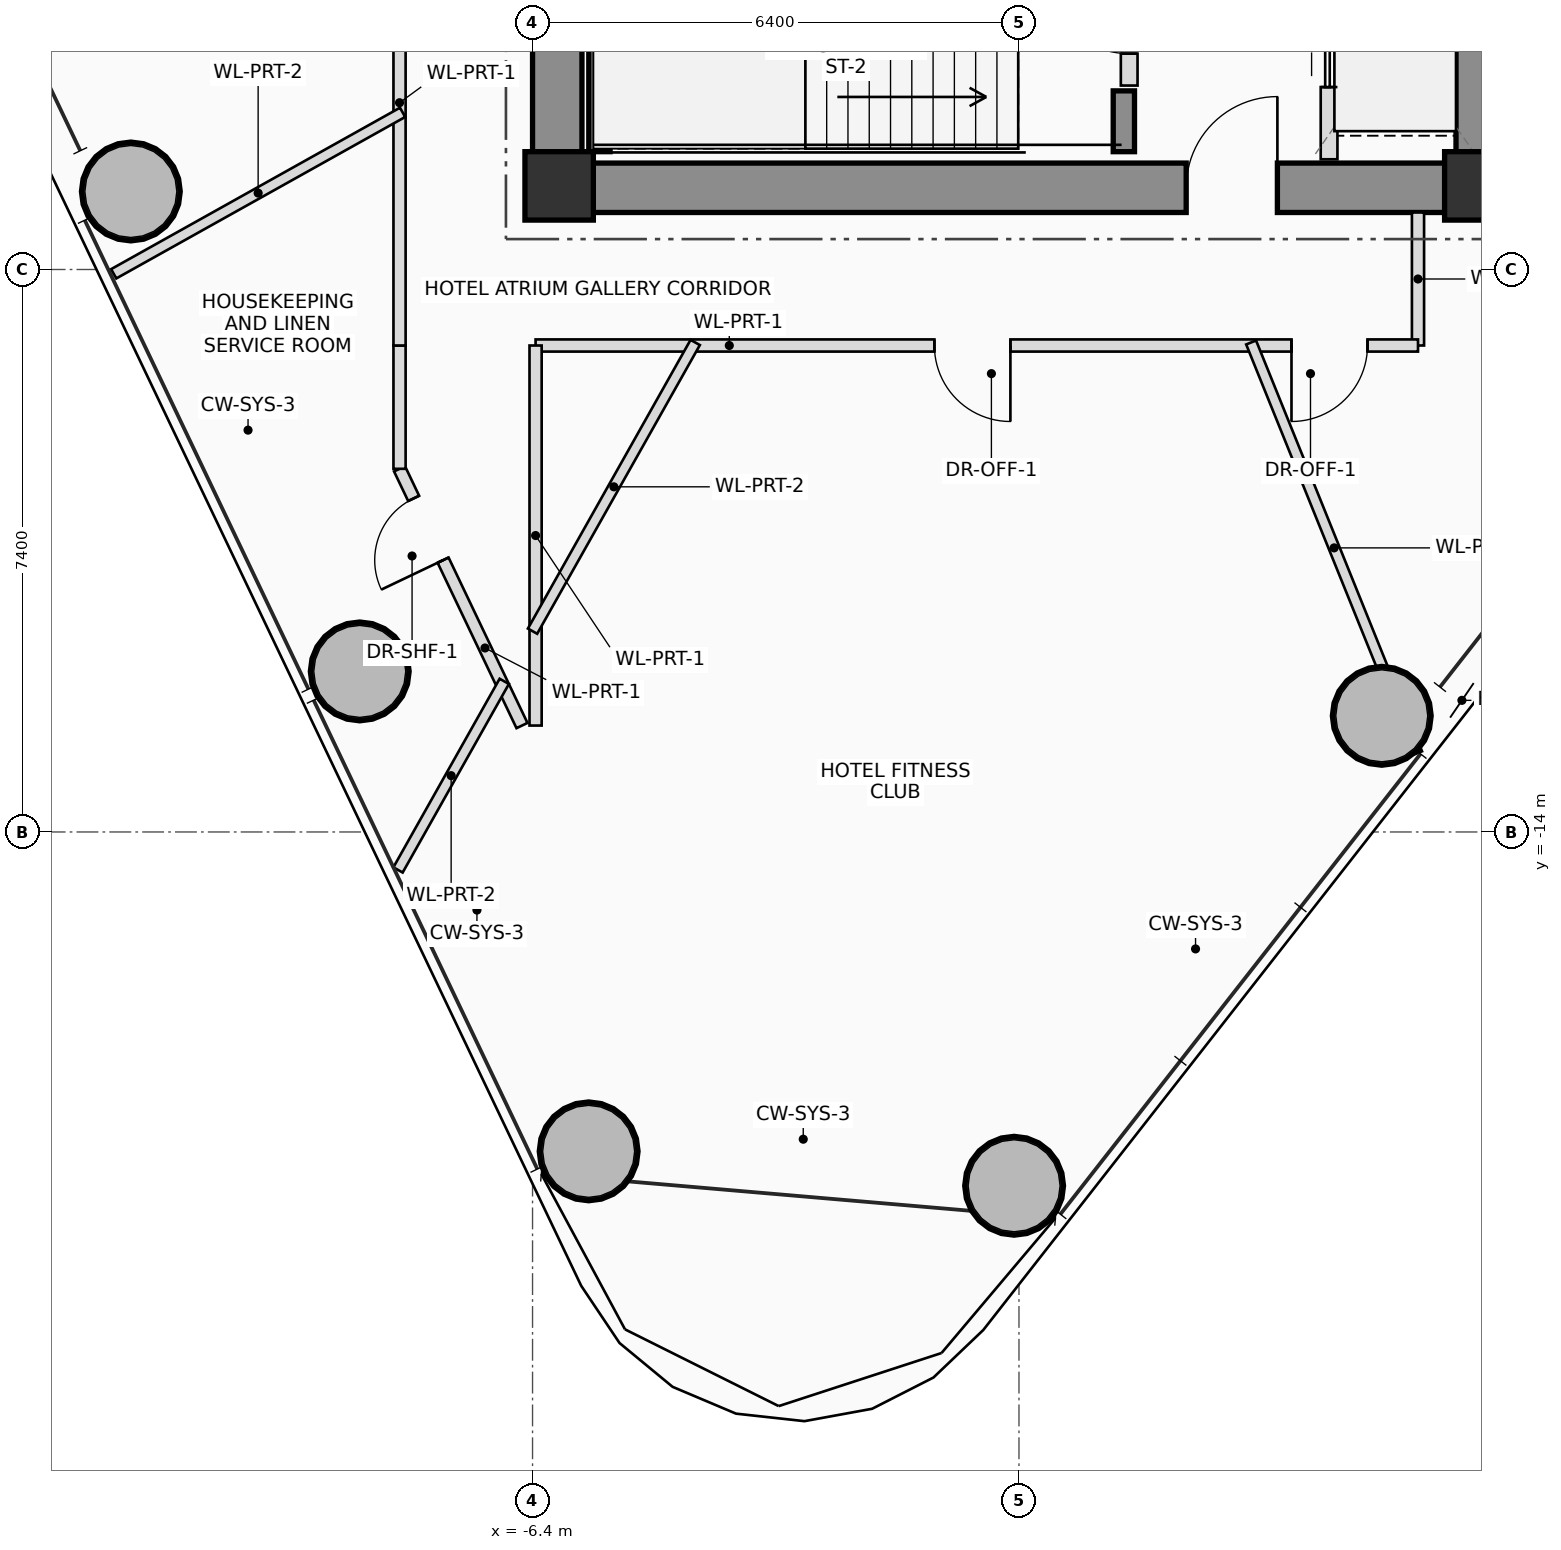
"""IFC4 building model, lengths in metres.
Left out: names, types, materials, properties, quantities, classifications, styles, units other than length and angle.
Written with IfcOpenShell. Run it as: python <this file> out.ifc"""

import sys

from ifc_helpers import new_model, si_unit, direction, frame, frame_2d, origin, origin_2d, place, context, subcontext, project, spatial, rectangle, hollow_circle, extrude, source, transform, mapped, element, fill, save


model = new_model("IFC4")
c1 = context("Model", 3, precision=1e-05, world=origin(), true_north=direction((0.0, 1.0)))
c2 = subcontext(c1, "Body", "Model", "MODEL_VIEW")
j1 = project(units=[si_unit("LENGTHUNIT", "METRE"), si_unit("PLANEANGLEUNIT", "RADIAN")], contexts=[c1])
p1 = place(None, origin())
s1 = spatial("IfcSite", under=j1, at=p1, CompositionType="ELEMENT")
p2 = place(p1, origin())
s2 = spatial("IfcBuilding", under=s1, at=p2, CompositionType="ELEMENT")
p3 = place(p2, frame((0.0, 0.0, 143.3)))
s3 = spatial("IfcBuildingStorey", under=s2, at=p3, CompositionType="ELEMENT", Elevation=143.3)
m1 = source(origin(), c2, "Body", "SweptSolid", [
    extrude(rectangle(XDim=0.9, YDim=0.9, at=origin_2d()), origin(), (0.0, 0.0, 1.0), 3.45),
])
for number, where, z_axis, x_axis in (
    (1, (-6.05, -5.5, 0.0), (0.0, 0.0, 1.0), (1.0, 0.0, 0.0)),
    (2, (6.05, -5.5, 0.0), (0.0, 0.0, 1.0), (1.0, 0.0, 0.0)),
):
    element("IfcColumn", number, at=place(p3, frame(where, z_axis=z_axis, x_axis=x_axis)), inside=s3, PredefinedType="COLUMN", context=c2, shape_type="MappedRepresentation", body=[
        mapped(m1, transform((0.0, 0.0, 0.0), scale=1.0)),
    ])
p4 = place(p3, frame((-6.4, -5.525, 0.0), z_axis=(0.0, 0.0, 1.0), x_axis=(1.0, 0.0, 0.0)))
e3 = element("IfcWall", 3, at=p4, inside=s3, PredefinedType="SHEAR", context=c2, shape_type="SweptSolid", body=[
    extrude(rectangle(XDim=12.8, YDim=0.65, at=frame_2d((6.4, 0.0))), origin(), (0.0, 0.0, 1.0), 3.45),
])
p5 = place(p4, frame((8.6, 0.0, 0.0)))
e4 = element("IfcOpeningElement", 4, at=p5, cuts=e3, PredefinedType="OPENING", context=c2, shape_type="SweptSolid", body=[
    extrude(rectangle(XDim=1.2, YDim=2.2, at=frame_2d((0.6, 1.1))), frame((0.0, 0.335, 0.0), z_axis=(0.0, -1.0, 0.0), x_axis=(1.0, 0.0, 0.0)), (0.0, 0.0, 1.0), 0.67),
])
p6 = place(p3, frame((6.075, -5.2, 0.0), z_axis=(0.0, 0.0, 1.0), x_axis=(0.0, 1.0, 0.0)))
e5 = element("IfcWall", 5, at=p6, inside=s3, PredefinedType="SHEAR", context=c2, shape_type="SweptSolid", body=[
    extrude(rectangle(XDim=10.4, YDim=0.65, at=frame_2d((5.2, 0.0))), origin(), (0.0, 0.0, 1.0), 3.45),
])
p7 = place(p3, frame((-6.075, -5.2, 0.0), z_axis=(0.0, 0.0, 1.0), x_axis=(0.0, 1.0, 0.0)))
e6 = element("IfcWall", 6, at=p7, inside=s3, PredefinedType="SHEAR", context=c2, shape_type="SweptSolid", body=[
    extrude(rectangle(XDim=3.45, YDim=0.65, at=frame_2d((1.725, 0.0))), origin(), (0.0, 0.0, 1.0), 3.45),
])
p8 = place(p3, frame((-5.52, -5.05, 0.0), z_axis=(0.0, 0.0, 1.0), x_axis=(0.0, 1.0, 0.0)))
e7 = element("IfcWall", 7, at=p8, inside=s3, PredefinedType="SHEAR", context=c2, shape_type="SweptSolid", body=[
    extrude(rectangle(XDim=2.75, YDim=0.28, at=frame_2d((1.375, 0.0))), origin(), (0.0, 0.0, 1.0), 3.45),
])
p9 = place(p3, frame((1.38, -5.05, 0.0), z_axis=(0.0, 0.0, 1.0), x_axis=(0.0, 1.0, 0.0)))
e8 = element("IfcWall", 8, at=p9, inside=s3, PredefinedType="SHEAR", context=c2, shape_type="SweptSolid", body=[
    extrude(rectangle(XDim=0.8, YDim=0.28, at=frame_2d((0.4, 0.0))), origin(), (0.0, 0.0, 1.0), 3.45),
])
m2 = source(origin(), c2, "Body", "SweptSolid", [
    extrude(hollow_circle(Radius=0.65, WallThickness=0.045, at=origin_2d()), origin(), (0.0, 0.0, 1.0), 3.45),
])
for number, where, z_axis, x_axis in (
    (9, (-0.064, -18.655, 0.0), (0.0, 0.0, 1.0), (1.0, 0.0, 0.0)),
    (10, (4.773, -12.472, 0.0), (0.0, 0.0, 1.0), (1.0, 0.0, 0.0)),
    (11, (-11.685, -5.573, 0.0), (0.0, 0.0, 1.0), (1.0, 0.0, 0.0)),
    (12, (-8.674, -11.888, 0.0), (0.0, 0.0, 1.0), (1.0, 0.0, 0.0)),
    (13, (-5.662, -18.202, 0.0), (0.0, 0.0, 1.0), (1.0, 0.0, 0.0)),
):
    element("IfcColumn", number, at=place(p3, frame(where, z_axis=z_axis, x_axis=x_axis)), inside=s3, PredefinedType="COLUMN", context=c2, shape_type="MappedRepresentation", body=[
        mapped(m2, transform((0.0, 0.0, 0.0), scale=1.0)),
    ])
p10 = place(p3, frame((1.45, -4.18, 0.0), z_axis=(0.0, 0.0, 1.0), x_axis=(0.0, 1.0, 0.0)))
e14 = element("IfcWall", 14, at=p10, inside=s3, PredefinedType="PLUMBINGWALL", context=c2, shape_type="SweptSolid", body=[
    extrude(rectangle(XDim=1.98, YDim=0.22, at=frame_2d((0.99, 0.0))), origin(), (0.0, 0.0, 1.0), 3.25),
])
p11 = place(p10, frame((0.42, 0.0, 0.0)))
e15 = element("IfcOpeningElement", 15, at=p11, cuts=e14, PredefinedType="OPENING", context=c2, shape_type="SweptSolid", body=[
    extrude(rectangle(XDim=1.15, YDim=2.15, at=frame_2d((0.575, 1.075))), frame((0.0, 0.12, 0.0), z_axis=(0.0, -1.0, 0.0), x_axis=(1.0, 0.0, 0.0)), (0.0, 0.0, 1.0), 0.24),
])
p12 = place(p3, frame((4.08, -5.15, 0.0), z_axis=(0.0, 0.0, 1.0), x_axis=(0.0, 1.0, 0.0)))
e16 = element("IfcWall", 16, at=p12, inside=s3, PredefinedType="PLUMBINGWALL", context=c2, shape_type="SweptSolid", body=[
    extrude(rectangle(XDim=2.95, YDim=0.22, at=frame_2d((1.475, 0.0))), origin(), (0.0, 0.0, 1.0), 3.25),
])
p13 = place(p12, frame((0.95, 0.0, 0.0)))
e17 = element("IfcOpeningElement", 17, at=p13, cuts=e16, PredefinedType="OPENING", context=c2, shape_type="SweptSolid", body=[
    extrude(rectangle(XDim=1.2, YDim=2.25, at=frame_2d((0.6, 1.125))), frame((0.0, 0.12, 0.0), z_axis=(0.0, -1.0, 0.0), x_axis=(1.0, 0.0, 0.0)), (0.0, 0.0, 1.0), 0.24),
])
p14 = place(p3, frame((-6.539, -12.6, 0.0), z_axis=(0.0, 0.0, 1.0), x_axis=(-0.430488060039, 0.902596271965, 0.0)))
e18 = element("IfcWall", 18, at=p14, inside=s3, PredefinedType="PARTITIONING", context=c2, shape_type="SweptSolid", body=[
    extrude(rectangle(XDim=3.742, YDim=0.16, at=frame_2d((1.871, 0.0))), origin(), (0.0, 0.0, 1.0), 2.605),
])
p15 = place(p14, frame((2.411, 0.0, 0.0)))
e19 = element("IfcOpeningElement", 19, at=p15, cuts=e18, PredefinedType="OPENING", context=c2, shape_type="SweptSolid", body=[
    extrude(rectangle(XDim=0.9, YDim=2.05, at=frame_2d((0.45, 1.025))), frame((0.0, 0.09, 0.0), z_axis=(0.0, -1.0, 0.0), x_axis=(1.0, 0.0, 0.0)), (0.0, 0.0, 1.0), 0.18),
])
p16 = place(p3, frame((-8.15, -9.222, 0.0), z_axis=(0.0, 0.0, 1.0), x_axis=(0.0, 1.0, 0.0)))
e20 = element("IfcWall", 20, at=p16, inside=s3, PredefinedType="PARTITIONING", context=c2, shape_type="SweptSolid", body=[
    extrude(rectangle(XDim=1.622, YDim=0.16, at=frame_2d((0.811, 0.0))), origin(), (0.0, 0.0, 1.0), 2.905),
])
p17 = place(p3, frame((-8.15, -7.6, 0.0), z_axis=(0.0, 0.0, 1.0), x_axis=(0.0, 1.0, 0.0)))
e21 = element("IfcWall", 21, at=p17, inside=s3, PredefinedType="PARTITIONING", context=c2, shape_type="SweptSolid", body=[
    extrude(rectangle(XDim=15.2, YDim=0.16, at=frame_2d((7.6, 0.0))), origin(), (0.0, 0.0, 1.0), 2.605),
])
p18 = place(p17, frame((6.538, 0.0, 0.0)))
e22 = element("IfcOpeningElement", 22, at=p18, cuts=e21, PredefinedType="OPENING", context=c2, shape_type="SweptSolid", body=[
    extrude(rectangle(XDim=1.05, YDim=2.2, at=frame_2d((0.525, 1.1))), frame((0.0, 0.09, 0.0), z_axis=(0.0, -1.0, 0.0), x_axis=(1.0, 0.0, 0.0)), (0.0, 0.0, 1.0), 0.18),
])
p19 = place(p17, frame((12.548, 0.0, 0.0)))
e23 = element("IfcOpeningElement", 23, at=p19, cuts=e21, PredefinedType="OPENING", context=c2, shape_type="SweptSolid", body=[
    extrude(rectangle(XDim=1.05, YDim=2.2, at=frame_2d((0.525, 1.1))), frame((0.0, 0.09, 0.0), z_axis=(0.0, -1.0, 0.0), x_axis=(1.0, 0.0, 0.0)), (0.0, 0.0, 1.0), 0.18),
])
p20 = place(p3, frame((5.25, -5.85, 0.0), z_axis=(0.0, 0.0, 1.0), x_axis=(0.0, -1.0, 0.0)))
e24 = element("IfcWall", 24, at=p20, inside=s3, PredefinedType="PARTITIONING", context=c2, shape_type="SweptSolid", body=[
    extrude(rectangle(XDim=1.75, YDim=0.16, at=frame_2d((0.875, 0.0))), origin(), (0.0, 0.0, 1.0), 3.25),
])
p21 = place(p3, frame((5.25, -7.6, 0.0), z_axis=(0.0, 0.0, 1.0), x_axis=(-1.0, 0.0, 0.0)))
e25 = element("IfcWall", 25, at=p21, inside=s3, PredefinedType="PARTITIONING", context=c2, shape_type="SweptSolid", body=[
    extrude(rectangle(XDim=11.61, YDim=0.16, at=frame_2d((5.805, 0.0))), origin(), (0.0, 0.0, 1.0), 2.605),
])
p22 = place(p21, frame((0.665, 0.0, 0.0)))
e26 = element("IfcOpeningElement", 26, at=p22, cuts=e25, PredefinedType="OPENING", context=c2, shape_type="SweptSolid", body=[
    extrude(rectangle(XDim=1.0, YDim=2.25, at=frame_2d((0.5, 1.125))), frame((0.0, 0.09, 0.0), z_axis=(0.0, -1.0, 0.0), x_axis=(1.0, 0.0, 0.0)), (0.0, 0.0, 1.0), 0.18),
])
p23 = place(p21, frame((5.363, 0.0, 0.0)))
e27 = element("IfcOpeningElement", 27, at=p23, cuts=e25, PredefinedType="OPENING", context=c2, shape_type="SweptSolid", body=[
    extrude(rectangle(XDim=1.0, YDim=2.25, at=frame_2d((0.5, 1.125))), frame((0.0, 0.09, 0.0), z_axis=(0.0, -1.0, 0.0), x_axis=(1.0, 0.0, 0.0)), (0.0, 0.0, 1.0), 0.18),
])
p24 = place(p3, frame((-6.36, -7.6, 0.0), z_axis=(0.0, 0.0, 1.0), x_axis=(0.0, -1.0, 0.0)))
e28 = element("IfcWall", 28, at=p24, inside=s3, PredefinedType="PARTITIONING", context=c2, shape_type="SweptSolid", body=[
    extrude(rectangle(XDim=5.0, YDim=0.16, at=frame_2d((2.5, 0.0))), origin(), (0.0, 0.0, 1.0), 3.25),
])
p25 = place(p3, frame((-8.11, -4.532, 0.0), z_axis=(0.0, 0.0, 1.0), x_axis=(-0.87291398503, -0.487874138216, 0.0)))
e29 = element("IfcWall", 29, at=p25, inside=s3, PredefinedType="PARTITIONING", context=c2, shape_type="SweptSolid", body=[
    extrude(rectangle(XDim=4.354, YDim=0.14, at=frame_2d((2.177, 0.0))), origin(), (0.0, 0.0, 1.0), 2.605),
])
p26 = place(p3, frame((-4.26, -7.56, 0.0), z_axis=(0.0, 0.0, 1.0), x_axis=(-0.490907196818, -0.871211870966, 0.0)))
e30 = element("IfcWall", 30, at=p26, inside=s3, PredefinedType="PARTITIONING", context=c2, shape_type="SweptSolid", body=[
    extrude(rectangle(XDim=4.36, YDim=0.14, at=frame_2d((2.18, 0.0))), origin(), (0.0, 0.0, 1.0), 2.605),
])
p27 = place(p3, frame((-6.772, -12.018, 0.0), z_axis=(0.0, 0.0, 1.0), x_axis=(-0.490867563053, -0.871234202464, 0.0)))
e31 = element("IfcWall", 31, at=p27, inside=s3, PredefinedType="PARTITIONING", context=c2, shape_type="SweptSolid", body=[
    extrude(rectangle(XDim=2.848, YDim=0.14, at=frame_2d((1.424, 0.0))), origin(), (0.0, 0.0, 1.0), 2.765),
])
p28 = place(p3, frame((3.054, -7.56, 0.0), z_axis=(0.0, 0.0, 1.0), x_axis=(0.374616076071, -0.927180023269, 0.0)))
e32 = element("IfcWall", 32, at=p28, inside=s3, PredefinedType="PARTITIONING", context=c2, shape_type="SweptSolid", body=[
    extrude(rectangle(XDim=5.83, YDim=0.14, at=frame_2d((2.915, 0.0))), origin(), (0.0, 0.0, 1.0), 2.605),
])
p29 = place(p5, origin())
e33 = element("IfcDoor", 33, at=p29, inside=s3, OperationType="SINGLE_SWING_RIGHT", PredefinedType="DOOR", context=c2, shape_type="SweptSolid", body=[
    extrude(rectangle(XDim=1.2, YDim=2.2, at=frame_2d((0.6, 1.1))), frame((0.0, 0.025, 0.0), z_axis=(0.0, -1.0, 0.0), x_axis=(1.0, 0.0, 0.0)), (0.0, 0.0, 1.0), 0.05),
])
fill(e4, e33)
p30 = place(p11, origin())
e34 = element("IfcDoor", 34, at=p30, inside=s3, OperationType="SINGLE_SWING_RIGHT", PredefinedType="DOOR", context=c2, shape_type="SweptSolid", body=[
    extrude(rectangle(XDim=1.15, YDim=2.15, at=frame_2d((0.575, 1.075))), frame((0.0, 0.025, 0.0), z_axis=(0.0, -1.0, 0.0), x_axis=(1.0, 0.0, 0.0)), (0.0, 0.0, 1.0), 0.05),
])
fill(e15, e34)
p31 = place(p13, origin())
e35 = element("IfcDoor", 35, at=p31, inside=s3, OperationType="DOUBLE_DOOR_SLIDING", PredefinedType="DOOR", context=c2, shape_type="SweptSolid", body=[
    extrude(rectangle(XDim=1.2, YDim=2.25, at=frame_2d((0.6, 1.125))), frame((0.0, 0.025, 0.0), z_axis=(0.0, -1.0, 0.0), x_axis=(1.0, 0.0, 0.0)), (0.0, 0.0, 1.0), 0.05),
])
fill(e17, e35)
p32 = place(p15, origin())
e36 = element("IfcDoor", 36, at=p32, inside=s3, OperationType="SINGLE_SWING_LEFT", PredefinedType="DOOR", context=c2, shape_type="SweptSolid", body=[
    extrude(rectangle(XDim=0.9, YDim=2.05, at=frame_2d((0.45, 1.025))), frame((0.0, 0.025, 0.0), z_axis=(0.0, -1.0, 0.0), x_axis=(1.0, 0.0, 0.0)), (0.0, 0.0, 1.0), 0.05),
])
fill(e19, e36)
p33 = place(p22, origin())
e37 = element("IfcDoor", 37, at=p33, inside=s3, OperationType="SINGLE_SWING_RIGHT", PredefinedType="DOOR", context=c2, shape_type="SweptSolid", body=[
    extrude(rectangle(XDim=1.0, YDim=2.25, at=frame_2d((0.5, 1.125))), frame((0.0, 0.025, 0.0), z_axis=(0.0, -1.0, 0.0), x_axis=(1.0, 0.0, 0.0)), (0.0, 0.0, 1.0), 0.05),
])
fill(e26, e37)
p34 = place(p23, origin())
e38 = element("IfcDoor", 38, at=p34, inside=s3, OperationType="SINGLE_SWING_LEFT", PredefinedType="DOOR", context=c2, shape_type="SweptSolid", body=[
    extrude(rectangle(XDim=1.0, YDim=2.25, at=frame_2d((0.5, 1.125))), frame((0.0, 0.025, 0.0), z_axis=(0.0, -1.0, 0.0), x_axis=(1.0, 0.0, 0.0)), (0.0, 0.0, 1.0), 0.05),
])
fill(e27, e38)
save(model, sys.argv[1])
